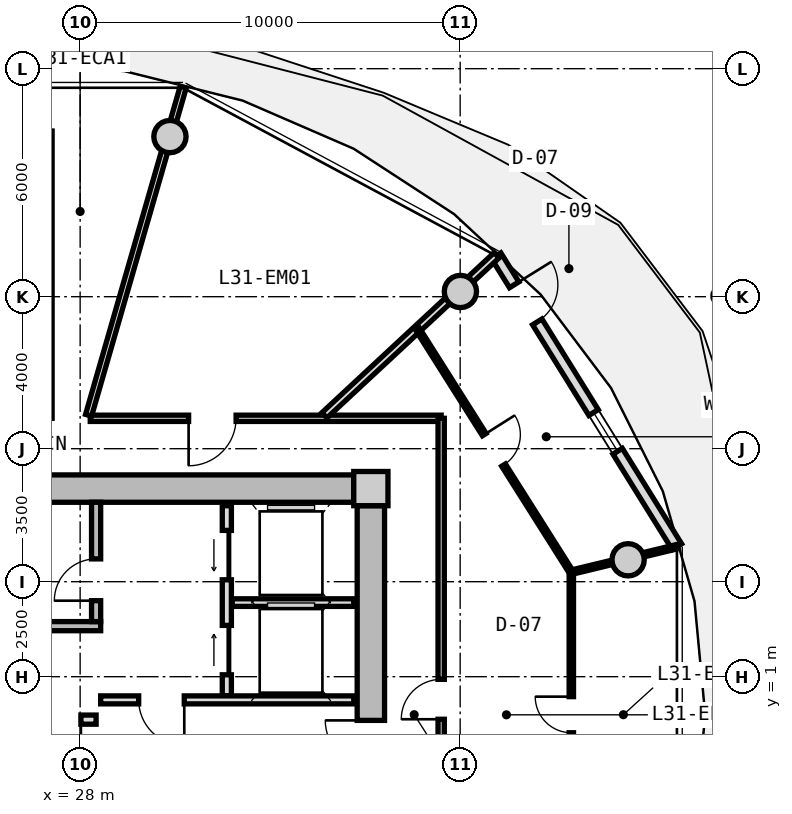
"""IFC4 building model, lengths in metres.
Left out: names, types, materials, properties, quantities, classifications, styles, units other than length and angle.
Written with IfcOpenShell. Run it as: python <this file> out.ifc"""

import sys

from ifc_helpers import new_model, si_unit, direction, frame, frame_2d, origin, origin_2d, place, context, subcontext, project, spatial, rectangle, circle, extrude, source, transform, mapped, element, fill, save


model = new_model("IFC4")
c1 = context("Model", 3, precision=1e-05, world=origin(), true_north=direction((0.0, 1.0)))
c2 = subcontext(c1, "Body", "Model", "MODEL_VIEW")
j1 = project(units=[si_unit("LENGTHUNIT", "METRE"), si_unit("PLANEANGLEUNIT", "RADIAN")], contexts=[c1])
p1 = place(None, origin())
s1 = spatial("IfcSite", under=j1, at=p1, CompositionType="ELEMENT")
p2 = place(p1, origin())
s2 = spatial("IfcBuilding", under=s1, at=p2, CompositionType="ELEMENT")
p3 = place(p2, frame((0.0, 0.0, 102.35)))
s3 = spatial("IfcBuildingStorey", under=s2, at=p3, CompositionType="ELEMENT", Elevation=102.35)
m1 = source(origin(), c2, "Body", "SweptSolid", [
    extrude(rectangle(XDim=0.9, YDim=0.9, at=origin_2d()), origin(), (0.0, 0.0, 1.0), 3.05),
])
p4 = place(p3, frame((35.65, 5.95, 0.0), z_axis=(0.0, 0.0, 1.0), x_axis=(1.0, 0.0, 0.0)))
e1 = element("IfcColumn", 1, at=p4, inside=s3, PredefinedType="COLUMN", context=c2, shape_type="MappedRepresentation", body=[
    mapped(m1, transform((0.0, 0.0, 0.0), x_axis=(1.0, 0.0, 0.0), y_axis=(0.0, 1.0, 0.0), z_axis=(0.0, 0.0, 1.0), scale=1.0)),
])
m2 = source(origin(), c2, "Body", "SweptSolid", [
    extrude(rectangle(XDim=14.4, YDim=0.72, at=frame_2d((7.2, 0.0))), origin(), (0.0, 0.0, 1.0), 2.79),
])
p5 = place(p3, frame((20.8, 5.95, 0.0), z_axis=(0.0, 0.0, 1.0), x_axis=(1.0, 0.0, 0.0)))
e2 = element("IfcWall", 2, at=p5, inside=s3, PredefinedType="SHEAR", context=c2, shape_type="MappedRepresentation", body=[
    mapped(m2, transform((0.0, 0.0, 0.0), x_axis=(1.0, 0.0, 0.0), y_axis=(0.0, 1.0, 0.0), z_axis=(0.0, 0.0, 1.0), scale=1.0)),
])
m3 = source(origin(), c2, "Body", "SweptSolid", [
    extrude(rectangle(XDim=11.0, YDim=0.72, at=frame_2d((5.5, 0.0))), origin(), (0.0, 0.0, 1.0), 2.79),
])
p6 = place(p3, frame((35.65, 5.5, 0.0), z_axis=(0.0, 0.0, 1.0), x_axis=(0.0, -1.0, 0.0)))
e3 = element("IfcWall", 3, at=p6, inside=s3, PredefinedType="SHEAR", context=c2, shape_type="MappedRepresentation", body=[
    mapped(m3, transform((0.0, 0.0, 0.0), x_axis=(1.0, 0.0, 0.0), y_axis=(0.0, 1.0, 0.0), z_axis=(0.0, 0.0, 1.0), scale=1.0)),
])
p7 = place(p6, frame((5.65, 0.0, 0.0)))
e4 = element("IfcOpeningElement", 4, at=p7, cuts=e3, PredefinedType="OPENING", context=c2, shape_type="SweptSolid", body=[
    extrude(rectangle(XDim=1.2, YDim=2.15, at=frame_2d((0.6, 1.075))), frame((0.0, 0.37, 0.0), z_axis=(0.0, -1.0, 0.0), x_axis=(1.0, 0.0, 0.0)), (0.0, 0.0, 1.0), 0.74),
])
m4 = source(origin(), c2, "Body", "SweptSolid", [
    extrude(circle(Radius=0.425, at=origin_2d()), origin(), (0.0, 0.0, 1.0), 3.05),
])
for number, where, z_axis, x_axis in (
    (5, (42.419, 4.076, 0.0), (0.0, 0.0, 1.0), (1.0, 0.0, 0.0)),
    (6, (38.006, 11.137, 0.0), (0.0, 0.0, 1.0), (1.0, 0.0, 0.0)),
    (7, (30.363, 15.213, 0.0), (0.0, 0.0, 1.0), (1.0, 0.0, 0.0)),
):
    element("IfcColumn", number, at=place(p3, frame(where, z_axis=z_axis, x_axis=x_axis)), inside=s3, PredefinedType="COLUMN", context=c2, shape_type="MappedRepresentation", body=[
        mapped(m4, transform((0.0, 0.0, 0.0), x_axis=(1.0, 0.0, 0.0), y_axis=(0.0, 1.0, 0.0), z_axis=(0.0, 0.0, 1.0), scale=1.0)),
    ])
m5 = source(origin(), c2, "Body", "SweptSolid", [
    extrude(rectangle(XDim=9.014, YDim=0.29, at=frame_2d((4.507, 0.0))), origin(), (0.0, 0.0, 1.0), 2.79),
])
p8 = place(p3, frame((38.947, 12.077, 0.0), z_axis=(0.0, 0.0, 1.0), x_axis=(0.527732945084, -0.849410347637, 0.0)))
e8 = element("IfcWall", 8, at=p8, inside=s3, PredefinedType="SOLIDWALL", context=c2, shape_type="MappedRepresentation", body=[
    mapped(m5, transform((0.0, 0.0, 0.0), x_axis=(1.0, 0.0, 0.0), y_axis=(0.0, 1.0, 0.0), z_axis=(0.0, 0.0, 1.0), scale=1.0)),
])
p9 = place(p8, frame((0.9, 0.0, 0.0)))
e9 = element("IfcOpeningElement", 9, at=p9, cuts=e8, PredefinedType="OPENING", context=c2, shape_type="SweptSolid", body=[
    extrude(rectangle(XDim=1.15, YDim=2.25, at=frame_2d((0.575, 1.125))), frame((0.0, 0.155, 0.0), z_axis=(0.0, -1.0, 0.0), x_axis=(1.0, 0.0, 0.0)), (0.0, 0.0, 1.0), 0.31),
])
p10 = place(p8, frame((4.857, 0.0, 0.85)))
e10 = element("IfcOpeningElement", 10, at=p10, cuts=e8, PredefinedType="OPENING", context=c2, shape_type="SweptSolid", body=[
    extrude(rectangle(XDim=1.2, YDim=1.5, at=frame_2d((0.6, 0.75))), frame((0.0, 0.155, 0.0), z_axis=(0.0, -1.0, 0.0), x_axis=(1.0, 0.0, 0.0)), (0.0, 0.0, 1.0), 0.31),
])
m6 = source(origin(), c2, "Body", "SweptSolid", [
    extrude(rectangle(XDim=7.83, YDim=0.24, at=frame_2d((3.915, 0.0))), origin(), (0.0, 0.0, 1.0), 2.79),
])
p11 = place(p3, frame((20.71, 2.33, 0.0), z_axis=(0.0, 0.0, 1.0), x_axis=(1.0, 0.0, 0.0)))
e11 = element("IfcWall", 11, at=p11, inside=s3, PredefinedType="PARTITIONING", context=c2, shape_type="MappedRepresentation", body=[
    mapped(m6, transform((0.0, 0.0, 0.0), x_axis=(1.0, 0.0, 0.0), y_axis=(0.0, 1.0, 0.0), z_axis=(0.0, 0.0, 1.0), scale=1.0)),
])
m7 = source(origin(), c2, "Body", "SweptSolid", [
    extrude(rectangle(XDim=3.14, YDim=0.24, at=frame_2d((1.57, 0.0))), origin(), (0.0, 0.0, 1.0), 2.79),
])
p12 = place(p3, frame((28.42, 2.45, 0.0), z_axis=(0.0, 0.0, 1.0), x_axis=(0.0, 1.0, 0.0)))
e12 = element("IfcWall", 12, at=p12, inside=s3, PredefinedType="PARTITIONING", context=c2, shape_type="MappedRepresentation", body=[
    mapped(m7, transform((0.0, 0.0, 0.0), x_axis=(1.0, 0.0, 0.0), y_axis=(0.0, 1.0, 0.0), z_axis=(0.0, 0.0, 1.0), scale=1.0)),
])
p13 = place(p12, frame((0.55, 0.0, 0.0)))
e13 = element("IfcOpeningElement", 13, at=p13, cuts=e12, PredefinedType="OPENING", context=c2, shape_type="SweptSolid", body=[
    extrude(rectangle(XDim=1.1, YDim=2.15, at=frame_2d((0.55, 1.075))), frame((0.0, 0.13, 0.0), z_axis=(0.0, -1.0, 0.0), x_axis=(1.0, 0.0, 0.0)), (0.0, 0.0, 1.0), 0.26),
])
m8 = source(origin(), c2, "Body", "SweptSolid", [
    extrude(rectangle(XDim=5.0, YDim=0.24, at=frame_2d((2.5, 0.0))), origin(), (0.0, 0.0, 1.0), 2.775),
])
p14 = place(p3, frame((31.86, 0.5, 0.0), z_axis=(0.0, 0.0, 1.0), x_axis=(0.0, 1.0, 0.0)))
e14 = element("IfcWall", 14, at=p14, inside=s3, PredefinedType="PARTITIONING", context=c2, shape_type="MappedRepresentation", body=[
    mapped(m8, transform((0.0, 0.0, 0.0), x_axis=(1.0, 0.0, 0.0), y_axis=(0.0, 1.0, 0.0), z_axis=(0.0, 0.0, 1.0), scale=1.0)),
])
p15 = place(p14, frame((3.05, 0.0, 0.0)))
e15 = element("IfcOpeningElement", 15, at=p15, cuts=e14, PredefinedType="OPENING", context=c2, shape_type="SweptSolid", body=[
    extrude(rectangle(XDim=1.3, YDim=2.2, at=frame_2d((0.65, 1.1))), frame((0.0, 0.13, 0.0), z_axis=(0.0, -1.0, 0.0), x_axis=(1.0, 0.0, 0.0)), (0.0, 0.0, 1.0), 0.26),
])
p16 = place(p14, frame((0.55, 0.0, 0.0)))
e16 = element("IfcOpeningElement", 16, at=p16, cuts=e14, PredefinedType="OPENING", context=c2, shape_type="SweptSolid", body=[
    extrude(rectangle(XDim=1.3, YDim=2.2, at=frame_2d((0.65, 1.1))), frame((0.0, 0.13, 0.0), z_axis=(0.0, -1.0, 0.0), x_axis=(1.0, 0.0, 0.0)), (0.0, 0.0, 1.0), 0.26),
])
m9 = source(origin(), c2, "Body", "SweptSolid", [
    extrude(rectangle(XDim=3.2, YDim=0.2, at=frame_2d((1.6, 0.0))), origin(), (0.0, 0.0, 1.0), 2.775),
])
p17 = place(p3, frame((32.0, 2.95, 0.0), z_axis=(0.0, 0.0, 1.0), x_axis=(1.0, 0.0, 0.0)))
e17 = element("IfcWall", 17, at=p17, inside=s3, PredefinedType="PARTITIONING", context=c2, shape_type="MappedRepresentation", body=[
    mapped(m9, transform((0.0, 0.0, 0.0), x_axis=(1.0, 0.0, 0.0), y_axis=(0.0, 1.0, 0.0), z_axis=(0.0, 0.0, 1.0), scale=1.0)),
])
m10 = source(origin(), c2, "Body", "SweptSolid", [
    extrude(rectangle(XDim=6.66, YDim=0.21, at=frame_2d((3.33, 0.0))), origin(), (0.0, 0.0, 1.0), 2.775),
])
p18 = place(p3, frame((28.54, 0.39, 0.0), z_axis=(0.0, 0.0, 1.0), x_axis=(1.0, 0.0, 0.0)))
e18 = element("IfcWall", 18, at=p18, inside=s3, PredefinedType="PARTITIONING", context=c2, shape_type="MappedRepresentation", body=[
    mapped(m10, transform((0.0, 0.0, 0.0), x_axis=(1.0, 0.0, 0.0), y_axis=(0.0, 1.0, 0.0), z_axis=(0.0, 0.0, 1.0), scale=1.0)),
])
p19 = place(p18, frame((1.0, 0.0, 0.0)))
e19 = element("IfcOpeningElement", 19, at=p19, cuts=e18, PredefinedType="OPENING", context=c2, shape_type="SweptSolid", body=[
    extrude(rectangle(XDim=1.2, YDim=2.15, at=frame_2d((0.6, 1.075))), frame((0.0, 0.115, 0.0), z_axis=(0.0, -1.0, 0.0), x_axis=(1.0, 0.0, 0.0)), (0.0, 0.0, 1.0), 0.23),
])
m11 = source(origin(), c2, "Body", "SweptSolid", [
    extrude(rectangle(XDim=7.62, YDim=0.24, at=frame_2d((3.81, 0.0))), origin(), (0.0, 0.0, 1.0), 2.775),
])
p20 = place(p3, frame((20.8, -0.13, 0.0), z_axis=(0.0, 0.0, 1.0), x_axis=(1.0, 0.0, 0.0)))
e20 = element("IfcWall", 20, at=p20, inside=s3, PredefinedType="PARTITIONING", context=c2, shape_type="MappedRepresentation", body=[
    mapped(m11, transform((0.0, 0.0, 0.0), x_axis=(1.0, 0.0, 0.0), y_axis=(0.0, 1.0, 0.0), z_axis=(0.0, 0.0, 1.0), scale=1.0)),
])
p21 = place(p20, frame((6.22, 0.0, 0.0)))
e21 = element("IfcOpeningElement", 21, at=p21, cuts=e20, PredefinedType="OPENING", context=c2, shape_type="SweptSolid", body=[
    extrude(rectangle(XDim=1.0, YDim=2.1, at=frame_2d((0.5, 1.05))), frame((0.0, 0.13, 0.0), z_axis=(0.0, -1.0, 0.0), x_axis=(1.0, 0.0, 0.0)), (0.0, 0.0, 1.0), 0.26),
])
p22 = place(p20, frame((2.4, 0.0, 0.0)))
e22 = element("IfcOpeningElement", 22, at=p22, cuts=e20, PredefinedType="OPENING", context=c2, shape_type="SweptSolid", body=[
    extrude(rectangle(XDim=1.0, YDim=2.1, at=frame_2d((0.5, 1.05))), frame((0.0, 0.13, 0.0), z_axis=(0.0, -1.0, 0.0), x_axis=(1.0, 0.0, 0.0)), (0.0, 0.0, 1.0), 0.26),
])
m12 = source(origin(), c2, "Body", "SweptSolid", [
    extrude(rectangle(XDim=9.234, YDim=0.165, at=frame_2d((4.617, 0.0))), origin(), (0.0, 0.0, 1.0), 2.775),
])
p23 = place(p3, frame((28.266, 7.8, 0.0), z_axis=(0.0, 0.0, 1.0), x_axis=(1.0, 0.0, 0.0)))
e23 = element("IfcWall", 23, at=p23, inside=s3, PredefinedType="PARTITIONING", context=c2, shape_type="MappedRepresentation", body=[
    mapped(m12, transform((0.0, 0.0, 0.0), x_axis=(1.0, 0.0, 0.0), y_axis=(0.0, 1.0, 0.0), z_axis=(0.0, 0.0, 1.0), scale=1.0)),
])
p24 = place(p23, frame((2.588, 0.0, 0.0)))
e24 = element("IfcOpeningElement", 24, at=p24, cuts=e23, PredefinedType="OPENING", context=c2, shape_type="SweptSolid", body=[
    extrude(rectangle(XDim=1.25, YDim=2.2, at=frame_2d((0.625, 1.1))), frame((0.0, 0.093, 0.0), z_axis=(0.0, -1.0, 0.0), x_axis=(1.0, 0.0, 0.0)), (0.0, 0.0, 1.0), 0.185),
])
m13 = source(origin(), c2, "Body", "SweptSolid", [
    extrude(rectangle(XDim=15.6, YDim=0.165, at=frame_2d((7.8, 0.0))), origin(), (0.0, 0.0, 1.0), 2.775),
])
p25 = place(p3, frame((37.5, 7.8, 0.0), z_axis=(0.0, 0.0, 1.0), x_axis=(0.0, -1.0, 0.0)))
e25 = element("IfcWall", 25, at=p25, inside=s3, PredefinedType="PARTITIONING", context=c2, shape_type="MappedRepresentation", body=[
    mapped(m13, transform((0.0, 0.0, 0.0), x_axis=(1.0, 0.0, 0.0), y_axis=(0.0, 1.0, 0.0), z_axis=(0.0, 0.0, 1.0), scale=1.0)),
])
p26 = place(p25, frame((6.87, 0.0, 0.0)))
e26 = element("IfcOpeningElement", 26, at=p26, cuts=e25, PredefinedType="OPENING", context=c2, shape_type="SweptSolid", body=[
    extrude(rectangle(XDim=1.05, YDim=2.15, at=frame_2d((0.525, 1.075))), frame((0.0, 0.093, 0.0), z_axis=(0.0, -1.0, 0.0), x_axis=(1.0, 0.0, 0.0)), (0.0, 0.0, 1.0), 0.185),
])
m14 = source(origin(), c2, "Body", "SweptSolid", [
    extrude(rectangle(XDim=8.989, YDim=0.165, at=frame_2d((4.495, 0.0))), origin(), (0.0, 0.0, 1.0), 2.275),
])
p27 = place(p3, frame((28.222, 7.88, 0.0), z_axis=(0.0, 0.0, 1.0), x_axis=(0.27702323008, 0.960863221274, 0.0)))
e27 = element("IfcWall", 27, at=p27, inside=s3, PredefinedType="PARTITIONING", context=c2, shape_type="MappedRepresentation", body=[
    mapped(m14, transform((0.0, 0.0, 0.0), x_axis=(1.0, 0.0, 0.0), y_axis=(0.0, 1.0, 0.0), z_axis=(0.0, 0.0, 1.0), scale=1.0)),
])
m15 = source(origin(), c2, "Body", "SweptSolid", [
    extrude(rectangle(XDim=6.187, YDim=0.19, at=frame_2d((3.093, 0.0))), origin(), (0.0, 0.0, 1.0), 2.275),
])
p28 = place(p3, frame((34.429, 7.88, 0.0), z_axis=(0.0, 0.0, 1.0), x_axis=(0.732501077882, 0.680765870841, 0.0)))
e28 = element("IfcWall", 28, at=p28, inside=s3, PredefinedType="PARTITIONING", context=c2, shape_type="MappedRepresentation", body=[
    mapped(m15, transform((0.0, 0.0, 0.0), x_axis=(1.0, 0.0, 0.0), y_axis=(0.0, 1.0, 0.0), z_axis=(0.0, 0.0, 1.0), scale=1.0)),
])
m16 = source(origin(), c2, "Body", "SweptSolid", [
    extrude(rectangle(XDim=7.499, YDim=0.115, at=frame_2d((3.75, 0.0))), origin(), (0.0, 0.0, 1.0), 2.775),
])
p29 = place(p3, frame((40.925, -3.75, 0.0), z_axis=(0.0, 0.0, 1.0), x_axis=(0.0, 1.0, 0.0)))
e29 = element("IfcWall", 29, at=p29, inside=s3, PredefinedType="PARTITIONING", context=c2, shape_type="MappedRepresentation", body=[
    mapped(m16, transform((0.0, 0.0, 0.0), x_axis=(1.0, 0.0, 0.0), y_axis=(0.0, 1.0, 0.0), z_axis=(0.0, 0.0, 1.0), scale=1.0)),
])
p30 = place(p29, frame((3.275, 0.0, 0.0)))
e30 = element("IfcOpeningElement", 30, at=p30, cuts=e29, PredefinedType="OPENING", context=c2, shape_type="SweptSolid", body=[
    extrude(rectangle(XDim=0.95, YDim=2.1, at=frame_2d((0.475, 1.05))), frame((0.0, 0.067, 0.0), z_axis=(0.0, -1.0, 0.0), x_axis=(1.0, 0.0, 0.0)), (0.0, 0.0, 1.0), 0.135),
])
m17 = source(origin(), c2, "Body", "SweptSolid", [
    extrude(rectangle(XDim=7.618, YDim=0.115, at=frame_2d((3.809, 0.0))), origin(), (0.0, 0.0, 1.0), 2.775),
])
p31 = place(p3, frame((40.923, 3.749, 0.0), z_axis=(0.0, 0.0, 1.0), x_axis=(-0.534316104929, 0.845284744931, 0.0)))
e31 = element("IfcWall", 31, at=p31, inside=s3, PredefinedType="PARTITIONING", context=c2, shape_type="MappedRepresentation", body=[
    mapped(m17, transform((0.0, 0.0, 0.0), x_axis=(1.0, 0.0, 0.0), y_axis=(0.0, 1.0, 0.0), z_axis=(0.0, 0.0, 1.0), scale=1.0)),
])
p32 = place(p31, frame((3.334, 0.0, 0.0)))
e32 = element("IfcOpeningElement", 32, at=p32, cuts=e31, PredefinedType="OPENING", context=c2, shape_type="SweptSolid", body=[
    extrude(rectangle(XDim=0.95, YDim=2.1, at=frame_2d((0.475, 1.05))), frame((0.0, 0.067, 0.0), z_axis=(0.0, -1.0, 0.0), x_axis=(1.0, 0.0, 0.0)), (0.0, 0.0, 1.0), 0.135),
])
m18 = source(origin(), c2, "Body", "SweptSolid", [
    extrude(rectangle(XDim=2.881, YDim=0.115, at=frame_2d((1.44, 0.0))), origin(), (0.0, 0.0, 1.0), 2.275),
])
p33 = place(p3, frame((40.923, 3.749, 0.0), z_axis=(0.0, 0.0, 1.0), x_axis=(0.972031524605, 0.234850410208, 0.0)))
e33 = element("IfcWall", 33, at=p33, inside=s3, PredefinedType="PARTITIONING", context=c2, shape_type="MappedRepresentation", body=[
    mapped(m18, transform((0.0, 0.0, 0.0), x_axis=(1.0, 0.0, 0.0), y_axis=(0.0, 1.0, 0.0), z_axis=(0.0, 0.0, 1.0), scale=1.0)),
])
m19 = source(origin(), c2, "Body", "SweptSolid", [
    extrude(rectangle(XDim=1.15, YDim=2.25, at=frame_2d((0.575, 1.125))), frame((0.0, 0.025, 0.0), z_axis=(0.0, -1.0, 0.0), x_axis=(1.0, 0.0, 0.0)), (0.0, 0.0, 1.0), 0.05),
])
p34 = place(p9, origin())
e34 = element("IfcDoor", 34, at=p34, inside=s3, OperationType="SINGLE_SWING_LEFT", PredefinedType="DOOR", context=c2, shape_type="MappedRepresentation", body=[
    mapped(m19, transform((0.0, 0.0, 0.0), x_axis=(1.0, 0.0, 0.0), y_axis=(0.0, 1.0, 0.0), z_axis=(0.0, 0.0, 1.0), scale=1.0)),
])
fill(e9, e34)
m20 = source(origin(), c2, "Body", "SweptSolid", [
    extrude(rectangle(XDim=1.2, YDim=1.5, at=frame_2d((0.6, 0.75))), frame((0.0, 0.03, 0.0), z_axis=(0.0, -1.0, 0.0), x_axis=(1.0, 0.0, 0.0)), (0.0, 0.0, 1.0), 0.06),
])
p35 = place(p10, origin())
e35 = element("IfcWindow", 35, at=p35, inside=s3, PartitioningType="SINGLE_PANEL", PredefinedType="WINDOW", context=c2, shape_type="MappedRepresentation", body=[
    mapped(m20, transform((0.0, 0.0, 0.0), x_axis=(1.0, 0.0, 0.0), y_axis=(0.0, 1.0, 0.0), z_axis=(0.0, 0.0, 1.0), scale=1.0)),
])
fill(e10, e35)
m21 = source(origin(), c2, "Body", "SweptSolid", [
    extrude(rectangle(XDim=1.1, YDim=2.15, at=frame_2d((0.55, 1.075))), frame((0.0, 0.025, 0.0), z_axis=(0.0, -1.0, 0.0), x_axis=(1.0, 0.0, 0.0)), (0.0, 0.0, 1.0), 0.05),
])
p36 = place(p13, origin())
e36 = element("IfcDoor", 36, at=p36, inside=s3, OperationType="SINGLE_SWING_LEFT", PredefinedType="DOOR", context=c2, shape_type="MappedRepresentation", body=[
    mapped(m21, transform((0.0, 0.0, 0.0), x_axis=(1.0, 0.0, 0.0), y_axis=(0.0, 1.0, 0.0), z_axis=(0.0, 0.0, 1.0), scale=1.0)),
])
fill(e13, e36)
m22 = source(origin(), c2, "Body", "SweptSolid", [
    extrude(rectangle(XDim=1.3, YDim=2.2, at=frame_2d((0.65, 1.1))), frame((0.0, 0.025, 0.0), z_axis=(0.0, -1.0, 0.0), x_axis=(1.0, 0.0, 0.0)), (0.0, 0.0, 1.0), 0.05),
])
p37 = place(p15, origin())
e37 = element("IfcDoor", 37, at=p37, inside=s3, OperationType="SLIDING_TO_LEFT", PredefinedType="DOOR", context=c2, shape_type="MappedRepresentation", body=[
    mapped(m22, transform((0.0, 0.0, 0.0), x_axis=(1.0, 0.0, 0.0), y_axis=(0.0, 1.0, 0.0), z_axis=(0.0, 0.0, 1.0), scale=1.0)),
])
fill(e15, e37)
p38 = place(p16, origin())
e38 = element("IfcDoor", 38, at=p38, inside=s3, OperationType="SLIDING_TO_RIGHT", PredefinedType="DOOR", context=c2, shape_type="MappedRepresentation", body=[
    mapped(m22, transform((0.0, 0.0, 0.0), x_axis=(1.0, 0.0, 0.0), y_axis=(0.0, 1.0, 0.0), z_axis=(0.0, 0.0, 1.0), scale=1.0)),
])
fill(e16, e38)
m23 = source(origin(), c2, "Body", "SweptSolid", [
    extrude(rectangle(XDim=1.2, YDim=2.15, at=frame_2d((0.6, 1.075))), frame((0.0, 0.025, 0.0), z_axis=(0.0, -1.0, 0.0), x_axis=(1.0, 0.0, 0.0)), (0.0, 0.0, 1.0), 0.05),
])
p39 = place(p19, frame((1.2, 0.0, 0.0), z_axis=(0.0, 0.0, 1.0), x_axis=(-1.0, 0.0, 0.0)))
e39 = element("IfcDoor", 39, at=p39, inside=s3, OperationType="SINGLE_SWING_LEFT", PredefinedType="DOOR", context=c2, shape_type="MappedRepresentation", body=[
    mapped(m23, transform((0.0, 0.0, 0.0), x_axis=(1.0, 0.0, 0.0), y_axis=(0.0, 1.0, 0.0), z_axis=(0.0, 0.0, 1.0), scale=1.0)),
])
fill(e19, e39)
p40 = place(p7, frame((1.2, 0.0, 0.0), z_axis=(0.0, 0.0, 1.0), x_axis=(-1.0, 0.0, 0.0)))
e40 = element("IfcDoor", 40, at=p40, inside=s3, OperationType="SINGLE_SWING_RIGHT", PredefinedType="DOOR", context=c2, shape_type="MappedRepresentation", body=[
    mapped(m23, transform((0.0, 0.0, 0.0), x_axis=(1.0, 0.0, 0.0), y_axis=(0.0, 1.0, 0.0), z_axis=(0.0, 0.0, 1.0), scale=1.0)),
])
fill(e4, e40)
m24 = source(origin(), c2, "Body", "SweptSolid", [
    extrude(rectangle(XDim=1.0, YDim=2.1, at=frame_2d((0.5, 1.05))), frame((0.0, 0.025, 0.0), z_axis=(0.0, -1.0, 0.0), x_axis=(1.0, 0.0, 0.0)), (0.0, 0.0, 1.0), 0.05),
])
p41 = place(p21, frame((1.0, 0.0, 0.0), z_axis=(0.0, 0.0, 1.0), x_axis=(-1.0, 0.0, 0.0)))
e41 = element("IfcDoor", 41, at=p41, inside=s3, OperationType="SINGLE_SWING_LEFT", PredefinedType="DOOR", context=c2, shape_type="MappedRepresentation", body=[
    mapped(m24, transform((0.0, 0.0, 0.0), x_axis=(1.0, 0.0, 0.0), y_axis=(0.0, 1.0, 0.0), z_axis=(0.0, 0.0, 1.0), scale=1.0)),
])
fill(e21, e41)
m25 = source(origin(), c2, "Body", "SweptSolid", [
    extrude(rectangle(XDim=1.05, YDim=2.15, at=frame_2d((0.525, 1.075))), frame((0.0, 0.025, 0.0), z_axis=(0.0, -1.0, 0.0), x_axis=(1.0, 0.0, 0.0)), (0.0, 0.0, 1.0), 0.05),
])
p42 = place(p26, frame((1.05, 0.0, 0.0), z_axis=(0.0, 0.0, 1.0), x_axis=(-1.0, 0.0, 0.0)))
e42 = element("IfcDoor", 42, at=p42, inside=s3, OperationType="SINGLE_SWING_LEFT", PredefinedType="DOOR", context=c2, shape_type="MappedRepresentation", body=[
    mapped(m25, transform((0.0, 0.0, 0.0), x_axis=(1.0, 0.0, 0.0), y_axis=(0.0, 1.0, 0.0), z_axis=(0.0, 0.0, 1.0), scale=1.0)),
])
fill(e26, e42)
m26 = source(origin(), c2, "Body", "SweptSolid", [
    extrude(rectangle(XDim=0.95, YDim=2.1, at=frame_2d((0.475, 1.05))), frame((0.0, 0.025, 0.0), z_axis=(0.0, -1.0, 0.0), x_axis=(1.0, 0.0, 0.0)), (0.0, 0.0, 1.0), 0.05),
])
p43 = place(p30, origin())
e43 = element("IfcDoor", 43, at=p43, inside=s3, OperationType="SINGLE_SWING_RIGHT", PredefinedType="DOOR", context=c2, shape_type="MappedRepresentation", body=[
    mapped(m26, transform((0.0, 0.0, 0.0), x_axis=(1.0, 0.0, 0.0), y_axis=(0.0, 1.0, 0.0), z_axis=(0.0, 0.0, 1.0), scale=1.0)),
])
fill(e30, e43)
p44 = place(p32, frame((0.95, 0.0, 0.0), z_axis=(0.0, 0.0, 1.0), x_axis=(-1.0, 0.0, 0.0)))
e44 = element("IfcDoor", 44, at=p44, inside=s3, OperationType="SINGLE_SWING_LEFT", PredefinedType="DOOR", context=c2, shape_type="MappedRepresentation", body=[
    mapped(m26, transform((0.0, 0.0, 0.0), x_axis=(1.0, 0.0, 0.0), y_axis=(0.0, 1.0, 0.0), z_axis=(0.0, 0.0, 1.0), scale=1.0)),
])
fill(e32, e44)
m27 = source(origin(), c2, "Body", "SweptSolid", [
    extrude(rectangle(XDim=1.25, YDim=2.2, at=frame_2d((0.625, 1.1))), frame((0.0, 0.025, 0.0), z_axis=(0.0, -1.0, 0.0), x_axis=(1.0, 0.0, 0.0)), (0.0, 0.0, 1.0), 0.05),
])
p45 = place(p24, frame((1.25, 0.0, 0.0), z_axis=(0.0, 0.0, 1.0), x_axis=(-1.0, 0.0, 0.0)))
e45 = element("IfcDoor", 45, at=p45, inside=s3, OperationType="SINGLE_SWING_RIGHT", PredefinedType="DOOR", context=c2, shape_type="MappedRepresentation", body=[
    mapped(m27, transform((0.0, 0.0, 0.0), x_axis=(1.0, 0.0, 0.0), y_axis=(0.0, 1.0, 0.0), z_axis=(0.0, 0.0, 1.0), scale=1.0)),
])
fill(e24, e45)
save(model, sys.argv[1])
